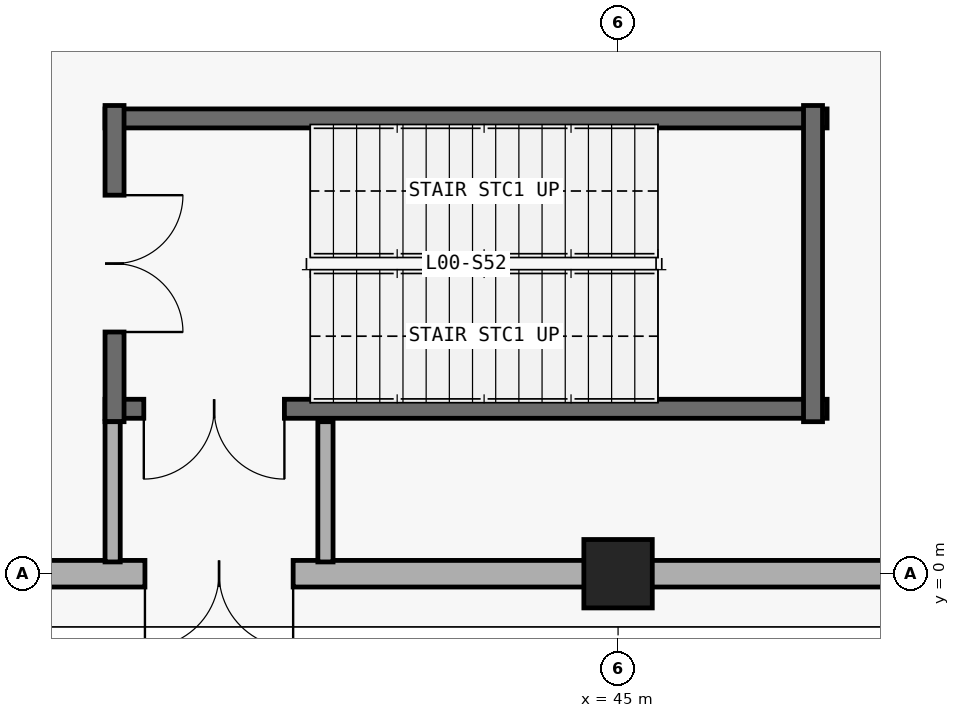
"""IFC4 building model, lengths in metres.
Left out: names, types, materials, properties, quantities, classifications, styles, units other than length and angle.
Written with IfcOpenShell. Run it as: python <this file> out.ifc"""

import sys

from ifc_helpers import new_model, si_unit, direction, frame, frame_2d, origin, origin_2d, place, context, subcontext, project, spatial, rectangle, extrude, element, fill, save


model = new_model("IFC4")
c1 = context("Model", 3, precision=1e-05, world=origin(), true_north=direction((0.0, 1.0)))
c2 = subcontext(c1, "Body", "Model", "MODEL_VIEW")
j1 = project(units=[si_unit("LENGTHUNIT", "METRE"), si_unit("PLANEANGLEUNIT", "RADIAN")], contexts=[c1])
p1 = place(None, origin())
s1 = spatial("IfcSite", under=j1, at=p1, CompositionType="ELEMENT")
p2 = place(p1, origin())
s2 = spatial("IfcBuilding", under=s1, at=p2, CompositionType="ELEMENT")
p3 = place(p2, origin())
s3 = spatial("IfcBuildingStorey", under=s2, at=p3, CompositionType="ELEMENT", Elevation=0.0)
p4 = place(p3, frame((45.0, 0.0, 0.0), z_axis=(0.0, 0.0, 1.0), x_axis=(1.0, 0.0, 0.0)))
e1 = element("IfcColumn", 1, at=p4, inside=s3, PredefinedType="COLUMN", context=c2, shape_type="SweptSolid", body=[
    extrude(rectangle(XDim=0.9, YDim=0.9, at=origin_2d()), origin(), (0.0, 0.0, 1.0), 5.4),
])
p5 = place(p3, frame((53.575, 0.0, 0.0), z_axis=(0.0, 0.0, 1.0), x_axis=(-1.0, 0.0, 0.0)))
e2 = element("IfcWall", 2, at=p5, inside=s3, PredefinedType="STANDARD", context=c2, shape_type="SweptSolid", body=[
    extrude(rectangle(XDim=8.15, YDim=0.35, at=frame_2d((4.075, 0.0))), origin(), (0.0, 0.0, 1.0), 4.384),
])
p6 = place(p5, frame((1.678, 0.0, 0.95)))
e3 = element("IfcOpeningElement", 3, at=p6, cuts=e2, PredefinedType="OPENING", context=c2, shape_type="SweptSolid", body=[
    extrude(rectangle(XDim=2.35, YDim=2.0, at=frame_2d((1.175, 1.0))), frame((0.0, 0.185, 0.0), z_axis=(0.0, -1.0, 0.0), x_axis=(1.0, 0.0, 0.0)), (0.0, 0.0, 1.0), 0.37),
])
p7 = place(p3, frame((44.575, 0.0, 0.0), z_axis=(0.0, 0.0, 1.0), x_axis=(-1.0, 0.0, 0.0)))
e4 = element("IfcWall", 4, at=p7, inside=s3, PredefinedType="STANDARD", context=c2, shape_type="SweptSolid", body=[
    extrude(rectangle(XDim=8.15, YDim=0.35, at=frame_2d((4.075, 0.0))), origin(), (0.0, 0.0, 1.0), 4.384),
])
p8 = place(p7, frame((3.85, 0.0, 0.0)))
e5 = element("IfcOpeningElement", 5, at=p8, cuts=e4, PredefinedType="OPENING", context=c2, shape_type="SweptSolid", body=[
    extrude(rectangle(XDim=1.95, YDim=2.25, at=frame_2d((0.975, 1.125))), frame((0.0, 0.185, 0.0), z_axis=(0.0, -1.0, 0.0), x_axis=(1.0, 0.0, 0.0)), (0.0, 0.0, 1.0), 0.37),
])
p9 = place(p3, frame((47.75, 2.17, 0.0), z_axis=(0.0, 0.0, 1.0), x_axis=(-1.0, 0.0, 0.0)))
e6 = element("IfcWall", 6, at=p9, inside=s3, PredefinedType="SHEAR", context=c2, shape_type="SweptSolid", body=[
    extrude(rectangle(XDim=9.5, YDim=0.25, at=frame_2d((4.75, 0.0))), origin(), (0.0, 0.0, 1.0), 5.1),
])
p10 = place(p9, frame((7.14, 0.0, 0.0)))
e7 = element("IfcOpeningElement", 7, at=p10, cuts=e6, PredefinedType="OPENING", context=c2, shape_type="SweptSolid", body=[
    extrude(rectangle(XDim=1.85, YDim=2.3, at=frame_2d((0.925, 1.15))), frame((0.0, 0.135, 0.0), z_axis=(0.0, -1.0, 0.0), x_axis=(1.0, 0.0, 0.0)), (0.0, 0.0, 1.0), 0.27),
])
p11 = place(p3, frame((47.75, 5.99, 0.0), z_axis=(0.0, 0.0, 1.0), x_axis=(-1.0, 0.0, 0.0)))
e8 = element("IfcWall", 8, at=p11, inside=s3, PredefinedType="SHEAR", context=c2, shape_type="SweptSolid", body=[
    extrude(rectangle(XDim=9.5, YDim=0.25, at=frame_2d((4.75, 0.0))), origin(), (0.0, 0.0, 1.0), 5.1),
])
p12 = place(p3, frame((38.375, 6.16, 0.0), z_axis=(0.0, 0.0, 1.0), x_axis=(0.0, -1.0, 0.0)))
e9 = element("IfcWall", 9, at=p12, inside=s3, PredefinedType="SHEAR", context=c2, shape_type="SweptSolid", body=[
    extrude(rectangle(XDim=4.16, YDim=0.25, at=frame_2d((2.08, 0.0))), origin(), (0.0, 0.0, 1.0), 5.1),
])
p13 = place(p12, frame((1.18, 0.0, 0.0)))
e10 = element("IfcOpeningElement", 10, at=p13, cuts=e9, PredefinedType="OPENING", context=c2, shape_type="SweptSolid", body=[
    extrude(rectangle(XDim=1.8, YDim=2.25, at=frame_2d((0.9, 1.125))), frame((0.0, 0.135, 0.0), z_axis=(0.0, -1.0, 0.0), x_axis=(1.0, 0.0, 0.0)), (0.0, 0.0, 1.0), 0.27),
])
p14 = place(p3, frame((47.565, 2.0, 0.0), z_axis=(0.0, 0.0, 1.0), x_axis=(0.0, 1.0, 0.0)))
e11 = element("IfcWall", 11, at=p14, inside=s3, PredefinedType="SHEAR", context=c2, shape_type="SweptSolid", body=[
    extrude(rectangle(XDim=4.16, YDim=0.25, at=frame_2d((2.08, 0.0))), origin(), (0.0, 0.0, 1.0), 5.1),
])
for number, where, z_axis, x_axis in (
    (12, (38.35, 2.0, 0.0), (0.0, 0.0, 1.0), (0.0, -1.0, 0.0)),
    (13, (41.15, 2.0, 0.0), (0.0, 0.0, 1.0), (0.0, -1.0, 0.0)),
):
    element("IfcWall", number, at=place(p3, frame(where, z_axis=z_axis, x_axis=x_axis)), inside=s3, PredefinedType="PARTITIONING", context=c2, shape_type="SweptSolid", body=[
        extrude(rectangle(XDim=1.845, YDim=0.2, at=frame_2d((0.922, 0.0))), origin(), (0.0, 0.0, 1.0), 4.384),
    ])
p15 = place(p8, origin())
e14 = element("IfcDoor", 14, at=p15, inside=s3, OperationType="DOUBLE_DOOR_SINGLE_SWING", PredefinedType="DOOR", context=c2, shape_type="SweptSolid", body=[
    extrude(rectangle(XDim=1.95, YDim=2.25, at=frame_2d((0.975, 1.125))), frame((0.0, 0.025, 0.0), z_axis=(0.0, -1.0, 0.0), x_axis=(1.0, 0.0, 0.0)), (0.0, 0.0, 1.0), 0.05),
])
fill(e5, e14)
p16 = place(p13, origin())
e15 = element("IfcDoor", 15, at=p16, inside=s3, OperationType="DOUBLE_DOOR_SINGLE_SWING", PredefinedType="DOOR", context=c2, shape_type="SweptSolid", body=[
    extrude(rectangle(XDim=1.8, YDim=2.25, at=frame_2d((0.9, 1.125))), frame((0.0, 0.025, 0.0), z_axis=(0.0, -1.0, 0.0), x_axis=(1.0, 0.0, 0.0)), (0.0, 0.0, 1.0), 0.05),
])
fill(e10, e15)
p17 = place(p10, origin())
e16 = element("IfcDoor", 16, at=p17, inside=s3, OperationType="DOUBLE_DOOR_SINGLE_SWING", PredefinedType="DOOR", context=c2, shape_type="SweptSolid", body=[
    extrude(rectangle(XDim=1.85, YDim=2.3, at=frame_2d((0.925, 1.15))), frame((0.0, 0.025, 0.0), z_axis=(0.0, -1.0, 0.0), x_axis=(1.0, 0.0, 0.0)), (0.0, 0.0, 1.0), 0.05),
])
fill(e7, e16)
save(model, sys.argv[1])
